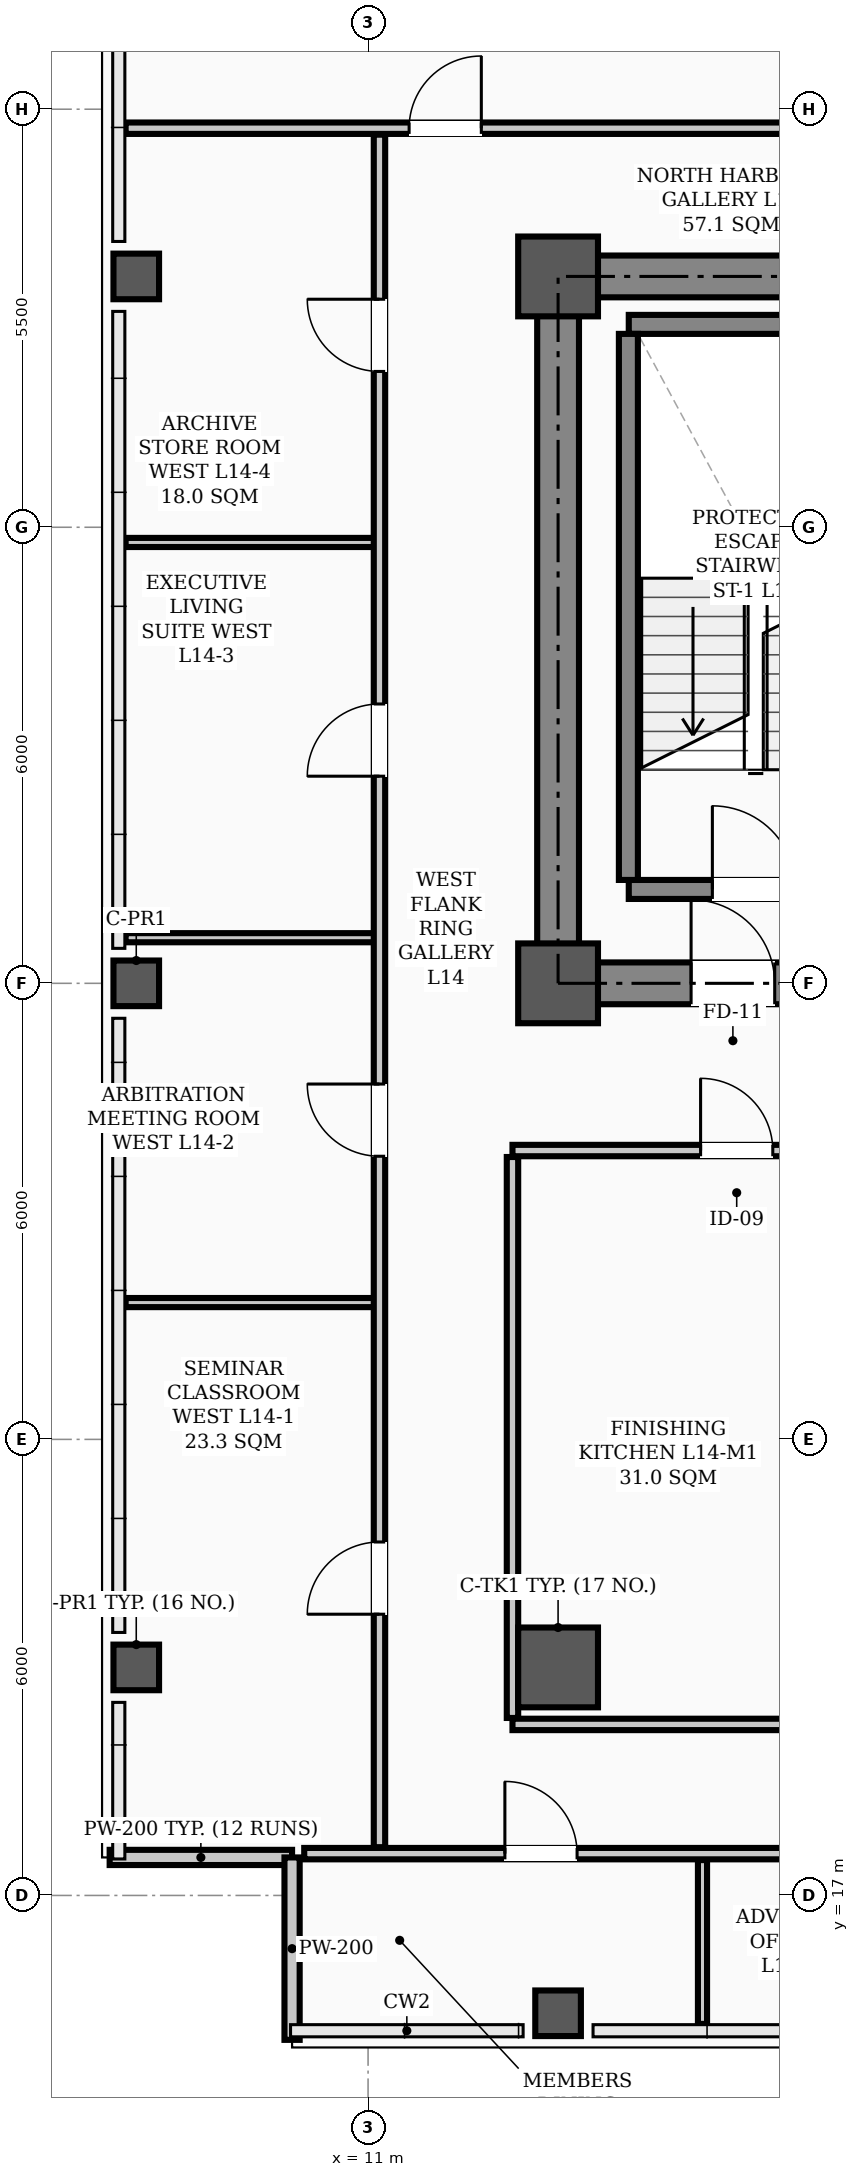
"""IFC4 building model, lengths in metres.
Left out: names, types, materials, properties, quantities, classifications, styles, units other than length and angle.
Written with IfcOpenShell. Run it as: python <this file> out.ifc"""

import sys

from ifc_helpers import new_model, si_unit, direction, frame, frame_2d, origin, origin_2d, place, context, subcontext, project, spatial, rectangle, hollow_rectangle, extrude, element, fill, save


model = new_model("IFC4")
c1 = context("Model", 3, precision=1e-05, world=origin(), true_north=direction((0.0, 1.0)))
c2 = subcontext(c1, "Body", "Model", "MODEL_VIEW")
j1 = project(units=[si_unit("LENGTHUNIT", "METRE"), si_unit("PLANEANGLEUNIT", "RADIAN")], contexts=[c1])
p1 = place(None, origin())
s1 = spatial("IfcSite", under=j1, at=p1, CompositionType="ELEMENT")
p2 = place(p1, origin())
s2 = spatial("IfcBuilding", under=s1, at=p2, CompositionType="ELEMENT")
p3 = place(p2, frame((0.0, 0.0, 57.7)))
s3 = spatial("IfcBuildingStorey", under=s2, at=p3, CompositionType="ELEMENT", Elevation=57.7)
for number, where, z_axis, x_axis in (
    (1, (13.5, 29.0, 0.0), (0.0, 0.0, 1.0), (1.0, 0.0, 0.0)),
    (2, (13.5, 38.3, 0.0), (0.0, 0.0, 1.0), (1.0, 0.0, 0.0)),
    (3, (13.5, 20.0, 0.0), (0.0, 0.0, 1.0), (1.0, 0.0, 0.0)),
):
    element("IfcColumn", number, at=place(p3, frame(where, z_axis=z_axis, x_axis=x_axis)), inside=s3, PredefinedType="COLUMN", context=c2, shape_type="SweptSolid", body=[
        extrude(hollow_rectangle(XDim=1.05, YDim=1.05, WallThickness=0.038, InnerFilletRadius=0.019, OuterFilletRadius=0.057, at=origin_2d()), origin(), (0.0, 0.0, 1.0), 3.9),
    ])
for number, where, z_axis, x_axis in (
    (4, (7.95, 20.0, 0.0), (0.0, 0.0, 1.0), (1.0, 0.0, 0.0)),
    (5, (7.95, 29.0, 0.0), (0.0, 0.0, 1.0), (1.0, 0.0, 0.0)),
    (6, (7.95, 38.3, 0.0), (0.0, 0.0, 1.0), (1.0, 0.0, 0.0)),
    (7, (13.5, 15.45, 0.0), (0.0, 0.0, 1.0), (1.0, 0.0, 0.0)),
):
    element("IfcColumn", number, at=place(p3, frame(where, z_axis=z_axis, x_axis=x_axis)), inside=s3, PredefinedType="COLUMN", context=c2, shape_type="SweptSolid", body=[
        extrude(hollow_rectangle(XDim=0.6, YDim=0.6, WallThickness=0.026, InnerFilletRadius=0.013, OuterFilletRadius=0.039, at=origin_2d()), origin(), (0.0, 0.0, 1.0), 3.9),
    ])
for number, where, z_axis, x_axis in (
    (8, (7.6, 17.5, 0.0), (0.0, 0.0, 1.0), (1.0, 0.0, 0.0)),
    (9, (10.0, 17.5, 0.0), (0.0, 0.0, 1.0), (0.0, -1.0, 0.0)),
):
    element("IfcWall", number, at=place(p3, frame(where, z_axis=z_axis, x_axis=x_axis)), inside=s3, PredefinedType="PARAPET", context=c2, shape_type="SweptSolid", body=[
        extrude(rectangle(XDim=2.4, YDim=0.2, at=frame_2d((1.2, 0.0))), origin(), (0.0, 0.0, 1.0), 1.2),
    ])
p4 = place(p3, frame((13.5, 29.0, 0.0), z_axis=(0.0, 0.0, 1.0), x_axis=(1.0, 0.0, 0.0)))
e10 = element("IfcWall", 10, at=p4, inside=s3, PredefinedType="SHEAR", context=c2, shape_type="SweptSolid", body=[
    extrude(rectangle(XDim=30.5, YDim=0.55, at=frame_2d((15.25, 0.0))), origin(), (0.0, 0.0, 1.0), 3.72),
])
p5 = place(p4, frame((1.75, 0.0, 0.0)))
e11 = element("IfcOpeningElement", 11, at=p5, cuts=e10, PredefinedType="OPENING", context=c2, shape_type="SweptSolid", body=[
    extrude(rectangle(XDim=1.1, YDim=2.08, at=frame_2d((0.55, 1.04))), frame((0.0, 0.285, 0.0), z_axis=(0.0, -1.0, 0.0), x_axis=(1.0, 0.0, 0.0)), (0.0, 0.0, 1.0), 0.57),
])
p6 = place(p4, frame((26.7, 0.0, 0.0)))
e12 = element("IfcOpeningElement", 12, at=p6, cuts=e10, PredefinedType="OPENING", context=c2, shape_type="SweptSolid", body=[
    extrude(rectangle(XDim=1.1, YDim=2.08, at=frame_2d((0.55, 1.04))), frame((0.0, 0.285, 0.0), z_axis=(0.0, -1.0, 0.0), x_axis=(1.0, 0.0, 0.0)), (0.0, 0.0, 1.0), 0.57),
])
p7 = place(p4, frame((6.8, 0.0, 0.0)))
e13 = element("IfcOpeningElement", 13, at=p7, cuts=e10, PredefinedType="OPENING", context=c2, shape_type="SweptSolid", body=[
    extrude(rectangle(XDim=1.1, YDim=2.08, at=frame_2d((0.55, 1.04))), frame((0.0, 0.285, 0.0), z_axis=(0.0, -1.0, 0.0), x_axis=(1.0, 0.0, 0.0)), (0.0, 0.0, 1.0), 0.57),
])
p8 = place(p4, frame((13.2, 0.0, 0.0)))
e14 = element("IfcOpeningElement", 14, at=p8, cuts=e10, PredefinedType="OPENING", context=c2, shape_type="SweptSolid", body=[
    extrude(rectangle(XDim=1.6, YDim=2.08, at=frame_2d((0.8, 1.04))), frame((0.0, 0.285, 0.0), z_axis=(0.0, -1.0, 0.0), x_axis=(1.0, 0.0, 0.0)), (0.0, 0.0, 1.0), 0.57),
])
p9 = place(p4, frame((20.525, 0.0, 0.0)))
e15 = element("IfcOpeningElement", 15, at=p9, cuts=e10, PredefinedType="OPENING", context=c2, shape_type="SweptSolid", body=[
    extrude(rectangle(XDim=0.95, YDim=2.08, at=frame_2d((0.475, 1.04))), frame((0.0, 0.285, 0.0), z_axis=(0.0, -1.0, 0.0), x_axis=(1.0, 0.0, 0.0)), (0.0, 0.0, 1.0), 0.57),
])
p10 = place(p3, frame((13.5, 38.3, 0.0), z_axis=(0.0, 0.0, 1.0), x_axis=(1.0, 0.0, 0.0)))
e16 = element("IfcWall", 16, at=p10, inside=s3, PredefinedType="SHEAR", context=c2, shape_type="SweptSolid", body=[
    extrude(rectangle(XDim=30.5, YDim=0.55, at=frame_2d((15.25, 0.0))), origin(), (0.0, 0.0, 1.0), 3.72),
])
p11 = place(p3, frame((13.5, 29.35, 0.0), z_axis=(0.0, 0.0, 1.0), x_axis=(0.0, 1.0, 0.0)))
e17 = element("IfcWall", 17, at=p11, inside=s3, PredefinedType="SHEAR", context=c2, shape_type="SweptSolid", body=[
    extrude(rectangle(XDim=8.6, YDim=0.55, at=frame_2d((4.3, 0.0))), origin(), (0.0, 0.0, 1.0), 3.72),
])
p12 = place(p3, frame((14.43, 30.235, 0.0), z_axis=(0.0, 0.0, 1.0), x_axis=(1.0, 0.0, 0.0)))
e18 = element("IfcWall", 18, at=p12, inside=s3, PredefinedType="STANDARD", context=c2, shape_type="SweptSolid", body=[
    extrude(rectangle(XDim=3.34, YDim=0.25, at=frame_2d((1.67, 0.0))), origin(), (0.0, 0.0, 1.0), 3.72),
])
p13 = place(p12, frame((1.1, 0.0, 0.0)))
e19 = element("IfcOpeningElement", 19, at=p13, cuts=e18, PredefinedType="OPENING", context=c2, shape_type="SweptSolid", body=[
    extrude(rectangle(XDim=1.1, YDim=2.08, at=frame_2d((0.55, 1.04))), frame((0.0, 0.135, 0.0), z_axis=(0.0, -1.0, 0.0), x_axis=(1.0, 0.0, 0.0)), (0.0, 0.0, 1.0), 0.27),
])
p14 = place(p3, frame((14.43, 37.669, 0.0), z_axis=(0.0, 0.0, 1.0), x_axis=(1.0, 0.0, 0.0)))
e20 = element("IfcWall", 20, at=p14, inside=s3, PredefinedType="STANDARD", context=c2, shape_type="SweptSolid", body=[
    extrude(rectangle(XDim=3.34, YDim=0.25, at=frame_2d((1.67, 0.0))), origin(), (0.0, 0.0, 1.0), 3.72),
])
p15 = place(p3, frame((14.425, 30.36, 0.0), z_axis=(0.0, 0.0, 1.0), x_axis=(0.0, 1.0, 0.0)))
e21 = element("IfcWall", 21, at=p15, inside=s3, PredefinedType="STANDARD", context=c2, shape_type="SweptSolid", body=[
    extrude(rectangle(XDim=7.184, YDim=0.25, at=frame_2d((3.592, 0.0))), origin(), (0.0, 0.0, 1.0), 3.72),
])
p16 = place(p3, frame((12.9, 26.8, 0.0), z_axis=(0.0, 0.0, 1.0), x_axis=(1.0, 0.0, 0.0)))
e22 = element("IfcWall", 22, at=p16, inside=s3, PredefinedType="PARTITIONING", context=c2, shape_type="SweptSolid", body=[
    extrude(rectangle(XDim=31.7, YDim=0.15, at=frame_2d((15.85, 0.0))), origin(), (0.0, 0.0, 1.0), 3.1),
])
p17 = place(p16, frame((13.6, 0.0, 0.0)))
e23 = element("IfcOpeningElement", 23, at=p17, cuts=e22, PredefinedType="OPENING", context=c2, shape_type="SweptSolid", body=[
    extrude(rectangle(XDim=1.6, YDim=2.08, at=frame_2d((0.8, 1.04))), frame((0.0, 0.085, 0.0), z_axis=(0.0, -1.0, 0.0), x_axis=(1.0, 0.0, 0.0)), (0.0, 0.0, 1.0), 0.17),
])
p18 = place(p16, frame((2.475, 0.0, 0.0)))
e24 = element("IfcOpeningElement", 24, at=p18, cuts=e22, PredefinedType="OPENING", context=c2, shape_type="SweptSolid", body=[
    extrude(rectangle(XDim=0.95, YDim=2.08, at=frame_2d((0.475, 1.04))), frame((0.0, 0.085, 0.0), z_axis=(0.0, -1.0, 0.0), x_axis=(1.0, 0.0, 0.0)), (0.0, 0.0, 1.0), 0.17),
])
p19 = place(p16, frame((5.725, 0.0, 0.0)))
e25 = element("IfcOpeningElement", 25, at=p19, cuts=e22, PredefinedType="OPENING", context=c2, shape_type="SweptSolid", body=[
    extrude(rectangle(XDim=0.95, YDim=2.08, at=frame_2d((0.475, 1.04))), frame((0.0, 0.085, 0.0), z_axis=(0.0, -1.0, 0.0), x_axis=(1.0, 0.0, 0.0)), (0.0, 0.0, 1.0), 0.17),
])
p20 = place(p16, frame((8.875, 0.0, 0.0)))
e26 = element("IfcOpeningElement", 26, at=p20, cuts=e22, PredefinedType="OPENING", context=c2, shape_type="SweptSolid", body=[
    extrude(rectangle(XDim=0.95, YDim=2.08, at=frame_2d((0.475, 1.04))), frame((0.0, 0.085, 0.0), z_axis=(0.0, -1.0, 0.0), x_axis=(1.0, 0.0, 0.0)), (0.0, 0.0, 1.0), 0.17),
])
p21 = place(p16, frame((16.075, 0.0, 0.0)))
e27 = element("IfcOpeningElement", 27, at=p21, cuts=e22, PredefinedType="OPENING", context=c2, shape_type="SweptSolid", body=[
    extrude(rectangle(XDim=0.95, YDim=2.08, at=frame_2d((0.475, 1.04))), frame((0.0, 0.085, 0.0), z_axis=(0.0, -1.0, 0.0), x_axis=(1.0, 0.0, 0.0)), (0.0, 0.0, 1.0), 0.17),
])
p22 = place(p16, frame((22.525, 0.0, 0.0)))
e28 = element("IfcOpeningElement", 28, at=p22, cuts=e22, PredefinedType="OPENING", context=c2, shape_type="SweptSolid", body=[
    extrude(rectangle(XDim=0.95, YDim=2.08, at=frame_2d((0.475, 1.04))), frame((0.0, 0.085, 0.0), z_axis=(0.0, -1.0, 0.0), x_axis=(1.0, 0.0, 0.0)), (0.0, 0.0, 1.0), 0.17),
])
p23 = place(p16, frame((28.825, 0.0, 0.0)))
e29 = element("IfcOpeningElement", 29, at=p23, cuts=e22, PredefinedType="OPENING", context=c2, shape_type="SweptSolid", body=[
    extrude(rectangle(XDim=0.95, YDim=2.08, at=frame_2d((0.475, 1.04))), frame((0.0, 0.085, 0.0), z_axis=(0.0, -1.0, 0.0), x_axis=(1.0, 0.0, 0.0)), (0.0, 0.0, 1.0), 0.17),
])
p24 = place(p3, frame((10.16, 17.55, 0.0), z_axis=(0.0, 0.0, 1.0), x_axis=(1.0, 0.0, 0.0)))
e30 = element("IfcWall", 30, at=p24, inside=s3, PredefinedType="PARTITIONING", context=c2, shape_type="SweptSolid", body=[
    extrude(rectangle(XDim=44.68, YDim=0.15, at=frame_2d((22.34, 0.0))), origin(), (0.0, 0.0, 1.0), 3.1),
])
p25 = place(p24, frame((2.64, 0.0, 0.0)))
e31 = element("IfcOpeningElement", 31, at=p25, cuts=e30, PredefinedType="OPENING", context=c2, shape_type="SweptSolid", body=[
    extrude(rectangle(XDim=0.95, YDim=2.08, at=frame_2d((0.475, 1.04))), frame((0.0, 0.085, 0.0), z_axis=(0.0, -1.0, 0.0), x_axis=(1.0, 0.0, 0.0)), (0.0, 0.0, 1.0), 0.17),
])
p26 = place(p24, frame((8.965, 0.0, 0.0)))
e32 = element("IfcOpeningElement", 32, at=p26, cuts=e30, PredefinedType="OPENING", context=c2, shape_type="SweptSolid", body=[
    extrude(rectangle(XDim=0.95, YDim=2.08, at=frame_2d((0.475, 1.04))), frame((0.0, 0.085, 0.0), z_axis=(0.0, -1.0, 0.0), x_axis=(1.0, 0.0, 0.0)), (0.0, 0.0, 1.0), 0.17),
])
p27 = place(p24, frame((23.815, 0.0, 0.0)))
e33 = element("IfcOpeningElement", 33, at=p27, cuts=e30, PredefinedType="OPENING", context=c2, shape_type="SweptSolid", body=[
    extrude(rectangle(XDim=0.95, YDim=2.08, at=frame_2d((0.475, 1.04))), frame((0.0, 0.085, 0.0), z_axis=(0.0, -1.0, 0.0), x_axis=(1.0, 0.0, 0.0)), (0.0, 0.0, 1.0), 0.17),
])
p28 = place(p24, frame((33.44, 0.0, 0.0)))
e34 = element("IfcOpeningElement", 34, at=p28, cuts=e30, PredefinedType="OPENING", context=c2, shape_type="SweptSolid", body=[
    extrude(rectangle(XDim=0.95, YDim=2.08, at=frame_2d((0.475, 1.04))), frame((0.0, 0.085, 0.0), z_axis=(0.0, -1.0, 0.0), x_axis=(1.0, 0.0, 0.0)), (0.0, 0.0, 1.0), 0.17),
])
p29 = place(p3, frame((12.9, 19.25, 0.0), z_axis=(0.0, 0.0, 1.0), x_axis=(1.0, 0.0, 0.0)))
e35 = element("IfcWall", 35, at=p29, inside=s3, PredefinedType="PARTITIONING", context=c2, shape_type="SweptSolid", body=[
    extrude(rectangle(XDim=13.3, YDim=0.15, at=frame_2d((6.65, 0.0))), origin(), (0.0, 0.0, 1.0), 3.1),
])
p30 = place(p3, frame((7.81, 24.8, 0.0), z_axis=(0.0, 0.0, 1.0), x_axis=(1.0, 0.0, 0.0)))
e36 = element("IfcWall", 36, at=p30, inside=s3, PredefinedType="PARTITIONING", context=c2, shape_type="SweptSolid", body=[
    extrude(rectangle(XDim=3.34, YDim=0.12, at=frame_2d((1.67, 0.0))), origin(), (0.0, 0.0, 1.0), 3.212),
])
p31 = place(p3, frame((7.81, 29.6, 0.0), z_axis=(0.0, 0.0, 1.0), x_axis=(1.0, 0.0, 0.0)))
e37 = element("IfcWall", 37, at=p31, inside=s3, PredefinedType="PARTITIONING", context=c2, shape_type="SweptSolid", body=[
    extrude(rectangle(XDim=3.34, YDim=0.12, at=frame_2d((1.67, 0.0))), origin(), (0.0, 0.0, 1.0), 3.0),
])
p32 = place(p3, frame((7.81, 34.8, 0.0), z_axis=(0.0, 0.0, 1.0), x_axis=(1.0, 0.0, 0.0)))
e38 = element("IfcWall", 38, at=p32, inside=s3, PredefinedType="PARTITIONING", context=c2, shape_type="SweptSolid", body=[
    extrude(rectangle(XDim=3.34, YDim=0.12, at=frame_2d((1.67, 0.0))), origin(), (0.0, 0.0, 1.0), 3.212),
])
p33 = place(p3, frame((7.81, 40.25, 0.0), z_axis=(0.0, 0.0, 1.0), x_axis=(1.0, 0.0, 0.0)))
e39 = element("IfcWall", 39, at=p33, inside=s3, PredefinedType="PARTITIONING", context=c2, shape_type="SweptSolid", body=[
    extrude(rectangle(XDim=49.38, YDim=0.15, at=frame_2d((24.69, 0.0))), origin(), (0.0, 0.0, 1.0), 3.1),
])
p34 = place(p33, frame((3.73, 0.0, 0.0)))
e40 = element("IfcOpeningElement", 40, at=p34, cuts=e39, PredefinedType="OPENING", context=c2, shape_type="SweptSolid", body=[
    extrude(rectangle(XDim=0.95, YDim=2.08, at=frame_2d((0.475, 1.04))), frame((0.0, 0.085, 0.0), z_axis=(0.0, -1.0, 0.0), x_axis=(1.0, 0.0, 0.0)), (0.0, 0.0, 1.0), 0.17),
])
p35 = place(p33, frame((13.815, 0.0, 0.0)))
e41 = element("IfcOpeningElement", 41, at=p35, cuts=e39, PredefinedType="OPENING", context=c2, shape_type="SweptSolid", body=[
    extrude(rectangle(XDim=0.95, YDim=2.08, at=frame_2d((0.475, 1.04))), frame((0.0, 0.085, 0.0), z_axis=(0.0, -1.0, 0.0), x_axis=(1.0, 0.0, 0.0)), (0.0, 0.0, 1.0), 0.17),
])
p36 = place(p33, frame((19.965, 0.0, 0.0)))
e42 = element("IfcOpeningElement", 42, at=p36, cuts=e39, PredefinedType="OPENING", context=c2, shape_type="SweptSolid", body=[
    extrude(rectangle(XDim=0.95, YDim=2.08, at=frame_2d((0.475, 1.04))), frame((0.0, 0.085, 0.0), z_axis=(0.0, -1.0, 0.0), x_axis=(1.0, 0.0, 0.0)), (0.0, 0.0, 1.0), 0.17),
])
p37 = place(p33, frame((30.815, 0.0, 0.0)))
e43 = element("IfcOpeningElement", 43, at=p37, cuts=e39, PredefinedType="OPENING", context=c2, shape_type="SweptSolid", body=[
    extrude(rectangle(XDim=0.95, YDim=2.08, at=frame_2d((0.475, 1.04))), frame((0.0, 0.085, 0.0), z_axis=(0.0, -1.0, 0.0), x_axis=(1.0, 0.0, 0.0)), (0.0, 0.0, 1.0), 0.17),
])
p38 = place(p33, frame((37.2, 0.0, 0.0)))
e44 = element("IfcOpeningElement", 44, at=p38, cuts=e39, PredefinedType="OPENING", context=c2, shape_type="SweptSolid", body=[
    extrude(rectangle(XDim=0.95, YDim=2.08, at=frame_2d((0.475, 1.04))), frame((0.0, 0.085, 0.0), z_axis=(0.0, -1.0, 0.0), x_axis=(1.0, 0.0, 0.0)), (0.0, 0.0, 1.0), 0.17),
])
p39 = place(p3, frame((11.15, 17.635, 0.0), z_axis=(0.0, 0.0, 1.0), x_axis=(0.0, 1.0, 0.0)))
e45 = element("IfcWall", 45, at=p39, inside=s3, PredefinedType="PARTITIONING", context=c2, shape_type="SweptSolid", body=[
    extrude(rectangle(XDim=22.53, YDim=0.15, at=frame_2d((11.265, 0.0))), origin(), (0.0, 0.0, 1.0), 3.0),
])
p40 = place(p39, frame((3.065, 0.0, 0.0)))
e46 = element("IfcOpeningElement", 46, at=p40, cuts=e45, PredefinedType="OPENING", context=c2, shape_type="SweptSolid", body=[
    extrude(rectangle(XDim=0.95, YDim=2.08, at=frame_2d((0.475, 1.04))), frame((0.0, 0.085, 0.0), z_axis=(0.0, -1.0, 0.0), x_axis=(1.0, 0.0, 0.0)), (0.0, 0.0, 1.0), 0.17),
])
p41 = place(p39, frame((9.09, 0.0, 0.0)))
e47 = element("IfcOpeningElement", 47, at=p41, cuts=e45, PredefinedType="OPENING", context=c2, shape_type="SweptSolid", body=[
    extrude(rectangle(XDim=0.95, YDim=2.08, at=frame_2d((0.475, 1.04))), frame((0.0, 0.085, 0.0), z_axis=(0.0, -1.0, 0.0), x_axis=(1.0, 0.0, 0.0)), (0.0, 0.0, 1.0), 0.17),
])
p42 = place(p39, frame((14.09, 0.0, 0.0)))
e48 = element("IfcOpeningElement", 48, at=p42, cuts=e45, PredefinedType="OPENING", context=c2, shape_type="SweptSolid", body=[
    extrude(rectangle(XDim=0.95, YDim=2.08, at=frame_2d((0.475, 1.04))), frame((0.0, 0.085, 0.0), z_axis=(0.0, -1.0, 0.0), x_axis=(1.0, 0.0, 0.0)), (0.0, 0.0, 1.0), 0.17),
])
p43 = place(p39, frame((19.415, 0.0, 0.0)))
e49 = element("IfcOpeningElement", 49, at=p43, cuts=e45, PredefinedType="OPENING", context=c2, shape_type="SweptSolid", body=[
    extrude(rectangle(XDim=0.95, YDim=2.08, at=frame_2d((0.475, 1.04))), frame((0.0, 0.085, 0.0), z_axis=(0.0, -1.0, 0.0), x_axis=(1.0, 0.0, 0.0)), (0.0, 0.0, 1.0), 0.17),
])
p44 = place(p3, frame((12.9, 19.335, 0.0), z_axis=(0.0, 0.0, 1.0), x_axis=(0.0, 1.0, 0.0)))
e50 = element("IfcWall", 50, at=p44, inside=s3, PredefinedType="PARTITIONING", context=c2, shape_type="SweptSolid", body=[
    extrude(rectangle(XDim=7.38, YDim=0.15, at=frame_2d((3.69, 0.0))), origin(), (0.0, 0.0, 1.0), 3.0),
])
p45 = place(p3, frame((15.4, 15.31, 0.0), z_axis=(0.0, 0.0, 1.0), x_axis=(0.0, 1.0, 0.0)))
e51 = element("IfcWall", 51, at=p45, inside=s3, PredefinedType="PARTITIONING", context=c2, shape_type="SweptSolid", body=[
    extrude(rectangle(XDim=2.155, YDim=0.12, at=frame_2d((1.078, 0.0))), origin(), (0.0, 0.0, 1.0), 3.212),
])
p46 = place(p13, origin())
e52 = element("IfcDoor", 52, at=p46, inside=s3, OperationType="SINGLE_SWING_LEFT", PredefinedType="DOOR", context=c2, shape_type="SweptSolid", body=[
    extrude(rectangle(XDim=1.1, YDim=2.08, at=frame_2d((0.55, 1.04))), frame((0.0, 0.025, 0.0), z_axis=(0.0, -1.0, 0.0), x_axis=(1.0, 0.0, 0.0)), (0.0, 0.0, 1.0), 0.05),
])
fill(e19, e52)
p47 = place(p5, origin())
e53 = element("IfcDoor", 53, at=p47, inside=s3, OperationType="SINGLE_SWING_LEFT", PredefinedType="DOOR", context=c2, shape_type="SweptSolid", body=[
    extrude(rectangle(XDim=1.1, YDim=2.08, at=frame_2d((0.55, 1.04))), frame((0.0, 0.025, 0.0), z_axis=(0.0, -1.0, 0.0), x_axis=(1.0, 0.0, 0.0)), (0.0, 0.0, 1.0), 0.05),
])
fill(e11, e53)
p48 = place(p25, origin())
e54 = element("IfcDoor", 54, at=p48, inside=s3, OperationType="SINGLE_SWING_LEFT", PredefinedType="DOOR", context=c2, shape_type="SweptSolid", body=[
    extrude(rectangle(XDim=0.95, YDim=2.08, at=frame_2d((0.475, 1.04))), frame((0.0, 0.025, 0.0), z_axis=(0.0, -1.0, 0.0), x_axis=(1.0, 0.0, 0.0)), (0.0, 0.0, 1.0), 0.05),
])
fill(e31, e54)
p49 = place(p18, origin())
e55 = element("IfcDoor", 55, at=p49, inside=s3, OperationType="SINGLE_SWING_LEFT", PredefinedType="DOOR", context=c2, shape_type="SweptSolid", body=[
    extrude(rectangle(XDim=0.95, YDim=2.08, at=frame_2d((0.475, 1.04))), frame((0.0, 0.025, 0.0), z_axis=(0.0, -1.0, 0.0), x_axis=(1.0, 0.0, 0.0)), (0.0, 0.0, 1.0), 0.05),
])
fill(e24, e55)
p50 = place(p40, origin())
e56 = element("IfcDoor", 56, at=p50, inside=s3, OperationType="SINGLE_SWING_LEFT", PredefinedType="DOOR", context=c2, shape_type="SweptSolid", body=[
    extrude(rectangle(XDim=0.95, YDim=2.08, at=frame_2d((0.475, 1.04))), frame((0.0, 0.025, 0.0), z_axis=(0.0, -1.0, 0.0), x_axis=(1.0, 0.0, 0.0)), (0.0, 0.0, 1.0), 0.05),
])
fill(e46, e56)
p51 = place(p41, origin())
e57 = element("IfcDoor", 57, at=p51, inside=s3, OperationType="SINGLE_SWING_RIGHT", PredefinedType="DOOR", context=c2, shape_type="SweptSolid", body=[
    extrude(rectangle(XDim=0.95, YDim=2.08, at=frame_2d((0.475, 1.04))), frame((0.0, 0.025, 0.0), z_axis=(0.0, -1.0, 0.0), x_axis=(1.0, 0.0, 0.0)), (0.0, 0.0, 1.0), 0.05),
])
fill(e47, e57)
p52 = place(p42, origin())
e58 = element("IfcDoor", 58, at=p52, inside=s3, OperationType="SINGLE_SWING_LEFT", PredefinedType="DOOR", context=c2, shape_type="SweptSolid", body=[
    extrude(rectangle(XDim=0.95, YDim=2.08, at=frame_2d((0.475, 1.04))), frame((0.0, 0.025, 0.0), z_axis=(0.0, -1.0, 0.0), x_axis=(1.0, 0.0, 0.0)), (0.0, 0.0, 1.0), 0.05),
])
fill(e48, e58)
p53 = place(p43, origin())
e59 = element("IfcDoor", 59, at=p53, inside=s3, OperationType="SINGLE_SWING_RIGHT", PredefinedType="DOOR", context=c2, shape_type="SweptSolid", body=[
    extrude(rectangle(XDim=0.95, YDim=2.08, at=frame_2d((0.475, 1.04))), frame((0.0, 0.025, 0.0), z_axis=(0.0, -1.0, 0.0), x_axis=(1.0, 0.0, 0.0)), (0.0, 0.0, 1.0), 0.05),
])
fill(e49, e59)
p54 = place(p34, origin())
e60 = element("IfcDoor", 60, at=p54, inside=s3, OperationType="SINGLE_SWING_RIGHT", PredefinedType="DOOR", context=c2, shape_type="SweptSolid", body=[
    extrude(rectangle(XDim=0.95, YDim=2.08, at=frame_2d((0.475, 1.04))), frame((0.0, 0.025, 0.0), z_axis=(0.0, -1.0, 0.0), x_axis=(1.0, 0.0, 0.0)), (0.0, 0.0, 1.0), 0.05),
])
fill(e40, e60)
save(model, sys.argv[1])
